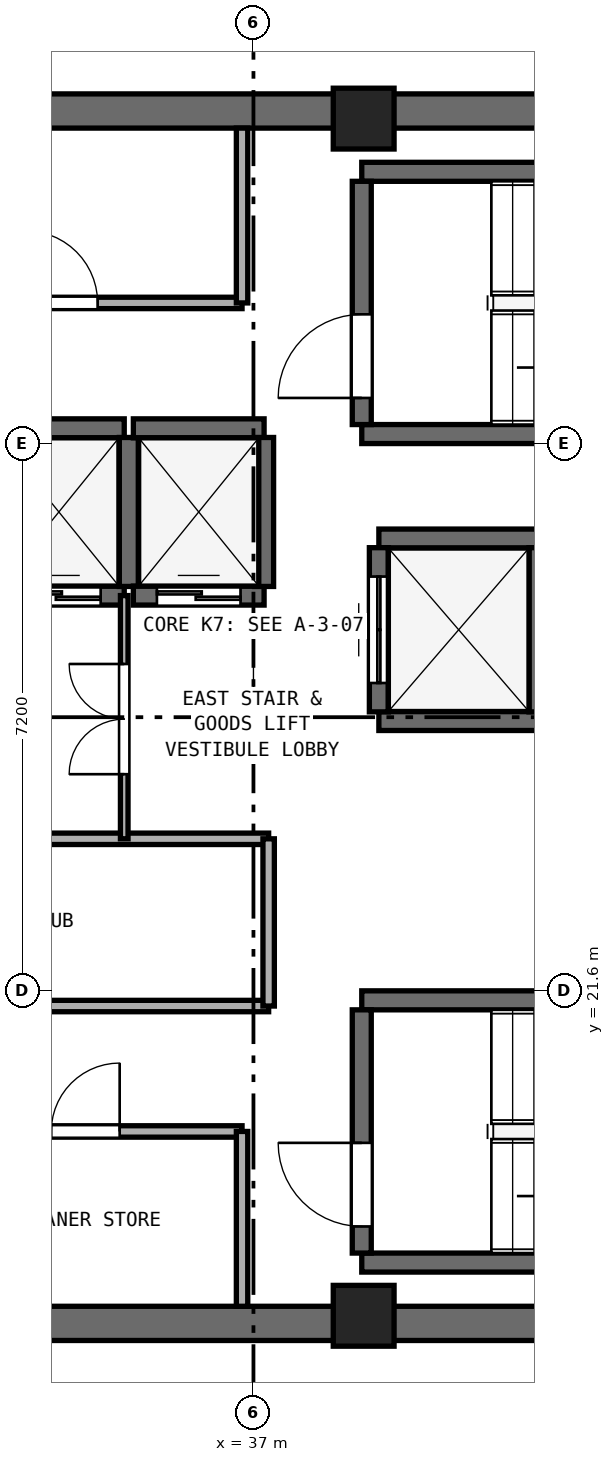
"""IFC4 building model, lengths in metres.
Left out: names, types, materials, properties, quantities, classifications, styles, units other than length and angle.
Written with IfcOpenShell. Run it as: python <this file> out.ifc"""

import sys

from ifc_helpers import new_model, si_unit, direction, frame, frame_2d, origin, origin_2d, place, context, subcontext, project, spatial, rectangle, extrude, element, fill, save


model = new_model("IFC4")
c1 = context("Model", 3, precision=1e-05, world=origin(), true_north=direction((0.0, 1.0)))
c2 = subcontext(c1, "Body", "Model", "MODEL_VIEW")
j1 = project(units=[si_unit("LENGTHUNIT", "METRE"), si_unit("PLANEANGLEUNIT", "RADIAN")], contexts=[c1])
p1 = place(None, origin())
s1 = spatial("IfcSite", under=j1, at=p1, CompositionType="ELEMENT")
p2 = place(p1, origin())
s2 = spatial("IfcBuilding", under=s1, at=p2, CompositionType="ELEMENT")
p3 = place(p2, frame((0.0, 0.0, 236.4)))
s3 = spatial("IfcBuildingStorey", under=s2, at=p3, CompositionType="ELEMENT", Elevation=236.4)
for number, where, z_axis, x_axis in (
    (1, (25.4, 17.225, 0.0), (0.0, 0.0, 1.0), (1.0, 0.0, 0.0)),
    (2, (25.4, 33.175, 0.0), (0.0, 0.0, 1.0), (1.0, 0.0, 0.0)),
):
    element("IfcWall", number, at=place(p3, frame(where, z_axis=z_axis, x_axis=x_axis)), inside=s3, PredefinedType="SHEAR", context=c2, shape_type="SweptSolid", body=[
        extrude(rectangle(XDim=23.2, YDim=0.45, at=frame_2d((11.6, 0.0))), origin(), (0.0, 0.0, 1.0), 3.51),
    ])
for number, where, z_axis, x_axis in (
    (3, (38.45, 17.325, 0.0), (0.0, 0.0, 1.0), (1.0, 0.0, 0.0)),
    (4, (38.45, 33.075, 0.0), (0.0, 0.0, 1.0), (1.0, 0.0, 0.0)),
):
    element("IfcColumn", number, at=place(p3, frame(where, z_axis=z_axis, x_axis=x_axis)), inside=s3, PredefinedType="PILASTER", context=c2, shape_type="SweptSolid", body=[
        extrude(rectangle(XDim=0.8, YDim=0.8, at=origin_2d()), origin(), (0.0, 0.0, 1.0), 3.8),
    ])
for number, where, z_axis, x_axis in (
    (5, (38.425, 28.925, 0.0), (0.0, 0.0, 1.0), (1.0, 0.0, 0.0)),
    (6, (38.425, 32.375, 0.0), (0.0, 0.0, 1.0), (1.0, 0.0, 0.0)),
):
    element("IfcWall", number, at=place(p3, frame(where, z_axis=z_axis, x_axis=x_axis)), inside=s3, PredefinedType="SHEAR", context=c2, shape_type="SweptSolid", body=[
        extrude(rectangle(XDim=7.3, YDim=0.25, at=frame_2d((3.65, 0.0))), origin(), (0.0, 0.0, 1.0), 3.51),
    ])
p4 = place(p3, frame((38.425, 29.05, 0.0), z_axis=(0.0, 0.0, 1.0), x_axis=(0.0, 1.0, 0.0)))
e7 = element("IfcWall", 7, at=p4, inside=s3, PredefinedType="SHEAR", context=c2, shape_type="SweptSolid", body=[
    extrude(rectangle(XDim=3.2, YDim=0.25, at=frame_2d((1.6, 0.0))), origin(), (0.0, 0.0, 1.0), 3.51),
])
p5 = place(p4, frame((0.35, 0.0, 0.0)))
e8 = element("IfcOpeningElement", 8, at=p5, cuts=e7, PredefinedType="OPENING", context=c2, shape_type="SweptSolid", body=[
    extrude(rectangle(XDim=1.1, YDim=2.15, at=frame_2d((0.55, 1.075))), frame((0.0, 0.135, 0.0), z_axis=(0.0, -1.0, 0.0), x_axis=(1.0, 0.0, 0.0)), (0.0, 0.0, 1.0), 0.27),
])
for number, where, z_axis, x_axis in (
    (9, (38.425, 18.025, 0.0), (0.0, 0.0, 1.0), (1.0, 0.0, 0.0)),
    (10, (38.425, 21.475, 0.0), (0.0, 0.0, 1.0), (1.0, 0.0, 0.0)),
):
    element("IfcWall", number, at=place(p3, frame(where, z_axis=z_axis, x_axis=x_axis)), inside=s3, PredefinedType="SHEAR", context=c2, shape_type="SweptSolid", body=[
        extrude(rectangle(XDim=7.3, YDim=0.25, at=frame_2d((3.65, 0.0))), origin(), (0.0, 0.0, 1.0), 3.51),
    ])
p6 = place(p3, frame((38.425, 18.15, 0.0), z_axis=(0.0, 0.0, 1.0), x_axis=(0.0, 1.0, 0.0)))
e11 = element("IfcWall", 11, at=p6, inside=s3, PredefinedType="SHEAR", context=c2, shape_type="SweptSolid", body=[
    extrude(rectangle(XDim=3.2, YDim=0.25, at=frame_2d((1.6, 0.0))), origin(), (0.0, 0.0, 1.0), 3.51),
])
p7 = place(p6, frame((0.35, 0.0, 0.0)))
e12 = element("IfcOpeningElement", 12, at=p7, cuts=e11, PredefinedType="OPENING", context=c2, shape_type="SweptSolid", body=[
    extrude(rectangle(XDim=1.1, YDim=2.15, at=frame_2d((0.55, 1.075))), frame((0.0, 0.135, 0.0), z_axis=(0.0, -1.0, 0.0), x_axis=(1.0, 0.0, 0.0)), (0.0, 0.0, 1.0), 0.27),
])
p8 = place(p3, frame((33.58, 26.8, 0.0), z_axis=(0.0, 0.0, 1.0), x_axis=(1.0, 0.0, 0.0)))
e13 = element("IfcWall", 13, at=p8, inside=s3, PredefinedType="SHEAR", context=c2, shape_type="SweptSolid", body=[
    extrude(rectangle(XDim=1.72, YDim=0.25, at=frame_2d((0.86, 0.0))), origin(), (0.0, 0.0, 1.0), 3.51),
])
p9 = place(p8, frame((0.31, 0.0, 0.0)))
e14 = element("IfcOpeningElement", 14, at=p9, cuts=e13, PredefinedType="OPENING", context=c2, shape_type="SweptSolid", body=[
    extrude(rectangle(XDim=1.1, YDim=2.15, at=frame_2d((0.55, 1.075))), frame((0.0, 0.135, 0.0), z_axis=(0.0, -1.0, 0.0), x_axis=(1.0, 0.0, 0.0)), (0.0, 0.0, 1.0), 0.27),
])
p10 = place(p3, frame((33.58, 29.0, 0.0), z_axis=(0.0, 0.0, 1.0), x_axis=(1.0, 0.0, 0.0)))
e15 = element("IfcWall", 15, at=p10, inside=s3, PredefinedType="SHEAR", context=c2, shape_type="SweptSolid", body=[
    extrude(rectangle(XDim=1.72, YDim=0.25, at=frame_2d((0.86, 0.0))), origin(), (0.0, 0.0, 1.0), 3.51),
])
p11 = place(p3, frame((35.36, 26.92, 0.0), z_axis=(0.0, 0.0, 1.0), x_axis=(0.0, 1.0, 0.0)))
e16 = element("IfcWall", 16, at=p11, inside=s3, PredefinedType="SHEAR", context=c2, shape_type="SweptSolid", body=[
    extrude(rectangle(XDim=1.96, YDim=0.25, at=frame_2d((0.98, 0.0))), origin(), (0.0, 0.0, 1.0), 3.51),
])
p12 = place(p3, frame((35.42, 26.8, 0.0), z_axis=(0.0, 0.0, 1.0), x_axis=(1.0, 0.0, 0.0)))
e17 = element("IfcWall", 17, at=p12, inside=s3, PredefinedType="SHEAR", context=c2, shape_type="SweptSolid", body=[
    extrude(rectangle(XDim=1.72, YDim=0.25, at=frame_2d((0.86, 0.0))), origin(), (0.0, 0.0, 1.0), 3.51),
])
p13 = place(p12, frame((0.31, 0.0, 0.0)))
e18 = element("IfcOpeningElement", 18, at=p13, cuts=e17, PredefinedType="OPENING", context=c2, shape_type="SweptSolid", body=[
    extrude(rectangle(XDim=1.1, YDim=2.15, at=frame_2d((0.55, 1.075))), frame((0.0, 0.135, 0.0), z_axis=(0.0, -1.0, 0.0), x_axis=(1.0, 0.0, 0.0)), (0.0, 0.0, 1.0), 0.27),
])
p14 = place(p3, frame((35.42, 29.0, 0.0), z_axis=(0.0, 0.0, 1.0), x_axis=(1.0, 0.0, 0.0)))
e19 = element("IfcWall", 19, at=p14, inside=s3, PredefinedType="SHEAR", context=c2, shape_type="SweptSolid", body=[
    extrude(rectangle(XDim=1.72, YDim=0.25, at=frame_2d((0.86, 0.0))), origin(), (0.0, 0.0, 1.0), 3.51),
])
p15 = place(p3, frame((37.14, 26.92, 0.0), z_axis=(0.0, 0.0, 1.0), x_axis=(0.0, 1.0, 0.0)))
e20 = element("IfcWall", 20, at=p15, inside=s3, PredefinedType="SHEAR", context=c2, shape_type="SweptSolid", body=[
    extrude(rectangle(XDim=1.96, YDim=0.25, at=frame_2d((0.98, 0.0))), origin(), (0.0, 0.0, 1.0), 3.51),
])
for number, where, z_axis, x_axis in (
    (21, (38.65, 25.15, 0.0), (0.0, 0.0, 1.0), (1.0, 0.0, 0.0)),
    (22, (38.65, 27.55, 0.0), (0.0, 0.0, 1.0), (1.0, 0.0, 0.0)),
):
    element("IfcWall", number, at=place(p3, frame(where, z_axis=z_axis, x_axis=x_axis)), inside=s3, PredefinedType="SHEAR", context=c2, shape_type="SweptSolid", body=[
        extrude(rectangle(XDim=2.1, YDim=0.25, at=frame_2d((1.05, 0.0))), origin(), (0.0, 0.0, 1.0), 3.51),
    ])
p16 = place(p3, frame((38.65, 25.27, 0.0), z_axis=(0.0, 0.0, 1.0), x_axis=(0.0, 1.0, 0.0)))
e23 = element("IfcWall", 23, at=p16, inside=s3, PredefinedType="SHEAR", context=c2, shape_type="SweptSolid", body=[
    extrude(rectangle(XDim=2.16, YDim=0.25, at=frame_2d((1.08, 0.0))), origin(), (0.0, 0.0, 1.0), 3.51),
])
p17 = place(p16, frame((0.38, 0.0, 0.0)))
e24 = element("IfcOpeningElement", 24, at=p17, cuts=e23, PredefinedType="OPENING", context=c2, shape_type="SweptSolid", body=[
    extrude(rectangle(XDim=1.4, YDim=2.2, at=frame_2d((0.7, 1.1))), frame((0.0, 0.135, 0.0), z_axis=(0.0, -1.0, 0.0), x_axis=(1.0, 0.0, 0.0)), (0.0, 0.0, 1.0), 0.27),
])
p18 = place(p3, frame((40.75, 25.27, 0.0), z_axis=(0.0, 0.0, 1.0), x_axis=(0.0, 1.0, 0.0)))
e25 = element("IfcWall", 25, at=p18, inside=s3, PredefinedType="SHEAR", context=c2, shape_type="SweptSolid", body=[
    extrude(rectangle(XDim=2.16, YDim=0.25, at=frame_2d((1.08, 0.0))), origin(), (0.0, 0.0, 1.0), 3.51),
])
p19 = place(p3, frame((32.1, 30.65, 0.0), z_axis=(0.0, 0.0, 1.0), x_axis=(1.0, 0.0, 0.0)))
e26 = element("IfcWall", 26, at=p19, inside=s3, PredefinedType="PARTITIONING", context=c2, shape_type="SweptSolid", body=[
    extrude(rectangle(XDim=4.75, YDim=0.15, at=frame_2d((2.375, 0.0))), origin(), (0.0, 0.0, 1.0), 3.51),
])
p20 = place(p19, frame((1.9, 0.0, 0.0)))
e27 = element("IfcOpeningElement", 27, at=p20, cuts=e26, PredefinedType="OPENING", context=c2, shape_type="SweptSolid", body=[
    extrude(rectangle(XDim=0.95, YDim=2.1, at=frame_2d((0.475, 1.05))), frame((0.0, 0.085, 0.0), z_axis=(0.0, -1.0, 0.0), x_axis=(1.0, 0.0, 0.0)), (0.0, 0.0, 1.0), 0.17),
])
p21 = place(p3, frame((36.85, 30.65, 0.0), z_axis=(0.0, 0.0, 1.0), x_axis=(0.0, 1.0, 0.0)))
e28 = element("IfcWall", 28, at=p21, inside=s3, PredefinedType="PARTITIONING", context=c2, shape_type="SweptSolid", body=[
    extrude(rectangle(XDim=2.3, YDim=0.15, at=frame_2d((1.15, 0.0))), origin(), (0.0, 0.0, 1.0), 3.51),
])
p22 = place(p3, frame((32.73, 19.75, 0.0), z_axis=(0.0, 0.0, 1.0), x_axis=(1.0, 0.0, 0.0)))
e29 = element("IfcWall", 29, at=p22, inside=s3, PredefinedType="PARTITIONING", context=c2, shape_type="SweptSolid", body=[
    extrude(rectangle(XDim=4.12, YDim=0.15, at=frame_2d((2.06, 0.0))), origin(), (0.0, 0.0, 1.0), 3.51),
])
p23 = place(p22, frame((1.61, 0.0, 0.0)))
e30 = element("IfcOpeningElement", 30, at=p23, cuts=e29, PredefinedType="OPENING", context=c2, shape_type="SweptSolid", body=[
    extrude(rectangle(XDim=0.9, YDim=2.1, at=frame_2d((0.45, 1.05))), frame((0.0, 0.085, 0.0), z_axis=(0.0, -1.0, 0.0), x_axis=(1.0, 0.0, 0.0)), (0.0, 0.0, 1.0), 0.17),
])
p24 = place(p3, frame((36.85, 17.45, 0.0), z_axis=(0.0, 0.0, 1.0), x_axis=(0.0, 1.0, 0.0)))
e31 = element("IfcWall", 31, at=p24, inside=s3, PredefinedType="PARTITIONING", context=c2, shape_type="SweptSolid", body=[
    extrude(rectangle(XDim=2.3, YDim=0.15, at=frame_2d((1.15, 0.0))), origin(), (0.0, 0.0, 1.0), 3.51),
])
p25 = place(p3, frame((30.08, 21.4, 0.0), z_axis=(0.0, 0.0, 1.0), x_axis=(1.0, 0.0, 0.0)))
e32 = element("IfcWall", 32, at=p25, inside=s3, PredefinedType="PARTITIONING", context=c2, shape_type="SweptSolid", body=[
    extrude(rectangle(XDim=7.12, YDim=0.15, at=frame_2d((3.56, 0.0))), origin(), (0.0, 0.0, 1.0), 3.51),
])
p26 = place(p3, frame((30.08, 23.6, 0.0), z_axis=(0.0, 0.0, 1.0), x_axis=(1.0, 0.0, 0.0)))
e33 = element("IfcWall", 33, at=p26, inside=s3, PredefinedType="PARTITIONING", context=c2, shape_type="SweptSolid", body=[
    extrude(rectangle(XDim=7.12, YDim=0.15, at=frame_2d((3.56, 0.0))), origin(), (0.0, 0.0, 1.0), 3.51),
])
p27 = place(p26, frame((3.11, 0.0, 0.0)))
e34 = element("IfcOpeningElement", 34, at=p27, cuts=e33, PredefinedType="OPENING", context=c2, shape_type="SweptSolid", body=[
    extrude(rectangle(XDim=0.9, YDim=2.1, at=frame_2d((0.45, 1.05))), frame((0.0, 0.085, 0.0), z_axis=(0.0, -1.0, 0.0), x_axis=(1.0, 0.0, 0.0)), (0.0, 0.0, 1.0), 0.17),
])
p28 = place(p3, frame((37.2, 21.4, 0.0), z_axis=(0.0, 0.0, 1.0), x_axis=(0.0, 1.0, 0.0)))
e35 = element("IfcWall", 35, at=p28, inside=s3, PredefinedType="PARTITIONING", context=c2, shape_type="SweptSolid", body=[
    extrude(rectangle(XDim=2.2, YDim=0.15, at=frame_2d((1.1, 0.0))), origin(), (0.0, 0.0, 1.0), 3.51),
])
p29 = place(p3, frame((35.3, 23.6, 0.0), z_axis=(0.0, 0.0, 1.0), x_axis=(0.0, 1.0, 0.0)))
e36 = element("IfcWall", 36, at=p29, inside=s3, PredefinedType="PARTITIONING", context=c2, shape_type="SweptSolid", body=[
    extrude(rectangle(XDim=3.2, YDim=0.1, at=frame_2d((1.6, 0.0))), origin(), (0.0, 0.0, 1.0), 3.51),
])
p30 = place(p29, frame((0.85, 0.0, 0.0)))
e37 = element("IfcOpeningElement", 37, at=p30, cuts=e36, PredefinedType="OPENING", context=c2, shape_type="SweptSolid", body=[
    extrude(rectangle(XDim=1.45, YDim=2.12, at=frame_2d((0.725, 1.06))), frame((0.0, 0.06, 0.0), z_axis=(0.0, -1.0, 0.0), x_axis=(1.0, 0.0, 0.0)), (0.0, 0.0, 1.0), 0.12),
])
p31 = place(p5, origin())
e38 = element("IfcDoor", 38, at=p31, inside=s3, OperationType="SINGLE_SWING_LEFT", PredefinedType="DOOR", context=c2, shape_type="SweptSolid", body=[
    extrude(rectangle(XDim=1.1, YDim=2.15, at=frame_2d((0.55, 1.075))), frame((0.0, 0.025, 0.0), z_axis=(0.0, -1.0, 0.0), x_axis=(1.0, 0.0, 0.0)), (0.0, 0.0, 1.0), 0.05),
])
fill(e8, e38)
p32 = place(p7, origin())
e39 = element("IfcDoor", 39, at=p32, inside=s3, OperationType="SINGLE_SWING_RIGHT", PredefinedType="DOOR", context=c2, shape_type="SweptSolid", body=[
    extrude(rectangle(XDim=1.1, YDim=2.15, at=frame_2d((0.55, 1.075))), frame((0.0, 0.025, 0.0), z_axis=(0.0, -1.0, 0.0), x_axis=(1.0, 0.0, 0.0)), (0.0, 0.0, 1.0), 0.05),
])
fill(e12, e39)
p33 = place(p9, origin())
e40 = element("IfcDoor", 40, at=p33, inside=s3, OperationType="DOUBLE_DOOR_SLIDING", PredefinedType="DOOR", context=c2, shape_type="SweptSolid", body=[
    extrude(rectangle(XDim=1.1, YDim=2.15, at=frame_2d((0.55, 1.075))), frame((0.0, 0.025, 0.0), z_axis=(0.0, -1.0, 0.0), x_axis=(1.0, 0.0, 0.0)), (0.0, 0.0, 1.0), 0.05),
])
fill(e14, e40)
p34 = place(p13, origin())
e41 = element("IfcDoor", 41, at=p34, inside=s3, OperationType="DOUBLE_DOOR_SLIDING", PredefinedType="DOOR", context=c2, shape_type="SweptSolid", body=[
    extrude(rectangle(XDim=1.1, YDim=2.15, at=frame_2d((0.55, 1.075))), frame((0.0, 0.025, 0.0), z_axis=(0.0, -1.0, 0.0), x_axis=(1.0, 0.0, 0.0)), (0.0, 0.0, 1.0), 0.05),
])
fill(e18, e41)
p35 = place(p17, origin())
e42 = element("IfcDoor", 42, at=p35, inside=s3, OperationType="DOUBLE_DOOR_SLIDING", PredefinedType="DOOR", context=c2, shape_type="SweptSolid", body=[
    extrude(rectangle(XDim=1.4, YDim=2.2, at=frame_2d((0.7, 1.1))), frame((0.0, 0.025, 0.0), z_axis=(0.0, -1.0, 0.0), x_axis=(1.0, 0.0, 0.0)), (0.0, 0.0, 1.0), 0.05),
])
fill(e24, e42)
p36 = place(p20, origin())
e43 = element("IfcDoor", 43, at=p36, inside=s3, OperationType="SINGLE_SWING_LEFT", PredefinedType="DOOR", context=c2, shape_type="SweptSolid", body=[
    extrude(rectangle(XDim=0.95, YDim=2.1, at=frame_2d((0.475, 1.05))), frame((0.0, 0.025, 0.0), z_axis=(0.0, -1.0, 0.0), x_axis=(1.0, 0.0, 0.0)), (0.0, 0.0, 1.0), 0.05),
])
fill(e27, e43)
p37 = place(p23, origin())
e44 = element("IfcDoor", 44, at=p37, inside=s3, OperationType="SINGLE_SWING_RIGHT", PredefinedType="DOOR", context=c2, shape_type="SweptSolid", body=[
    extrude(rectangle(XDim=0.9, YDim=2.1, at=frame_2d((0.45, 1.05))), frame((0.0, 0.025, 0.0), z_axis=(0.0, -1.0, 0.0), x_axis=(1.0, 0.0, 0.0)), (0.0, 0.0, 1.0), 0.05),
])
fill(e30, e44)
p38 = place(p30, origin())
e45 = element("IfcDoor", 45, at=p38, inside=s3, OperationType="DOUBLE_DOOR_SINGLE_SWING", PredefinedType="DOOR", context=c2, shape_type="SweptSolid", body=[
    extrude(rectangle(XDim=1.45, YDim=2.12, at=frame_2d((0.725, 1.06))), frame((0.0, 0.025, 0.0), z_axis=(0.0, -1.0, 0.0), x_axis=(1.0, 0.0, 0.0)), (0.0, 0.0, 1.0), 0.05),
])
fill(e37, e45)
save(model, sys.argv[1])
